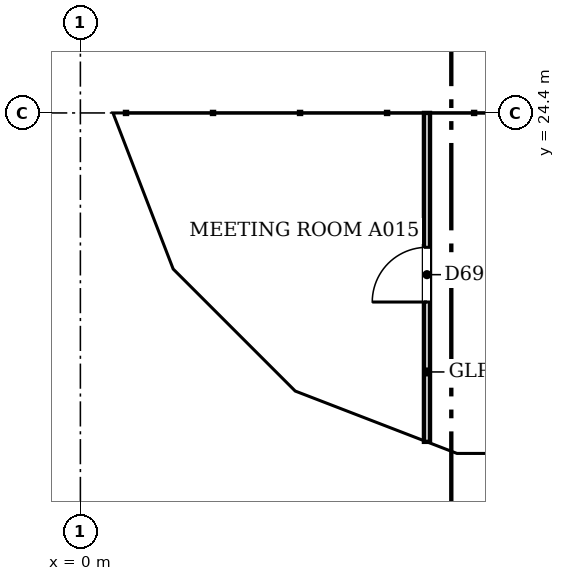
"""IFC4 building model, lengths in metres.
Left out: names, types, materials, properties, quantities, classifications, styles, units other than length and angle.
Written with IfcOpenShell. Run it as: python <this file> out.ifc"""

import sys

from ifc_helpers import new_model, si_unit, direction, frame, frame_2d, origin, place, context, subcontext, project, spatial, polyline, rectangle, outline, extrude, faceted_brep, source, transform, mapped, element, fill, save


model = new_model("IFC4")
c1 = context("Model", 3, precision=1e-05, world=origin(), true_north=direction((0.0, 1.0)))
c2 = subcontext(c1, "Body", "Model", "MODEL_VIEW")
j1 = project(units=[si_unit("LENGTHUNIT", "METRE"), si_unit("PLANEANGLEUNIT", "RADIAN")], contexts=[c1])
p1 = place(None, origin())
s1 = spatial("IfcSite", under=j1, at=p1, CompositionType="ELEMENT")
p2 = place(p1, origin())
s2 = spatial("IfcBuilding", under=s1, at=p2, CompositionType="ELEMENT")
p3 = place(p2, frame((0.0, 0.0, 159.2)))
s3 = spatial("IfcBuildingStorey", under=s2, at=p3, CompositionType="ELEMENT", Elevation=159.2)
m1 = source(origin(), c2, "Body", "Brep", [
    faceted_brep([(3.003, -0.25, 0.0), (3.05, -0.25, 0.06), (3.05, -0.25, 7.54), (3.003, -0.25, 7.6), (0.0, -0.25, 3.8), (0.0, 0.25, 3.8), (2.957, 0.25, 7.541), (2.957, 0.25, 0.059), (3.003, 0.0, 0.0), (3.003, 0.0, 7.6)], [[[0, 1, 2, 3, 4]], [[5, 6, 7]], [[1, 0, 8]], [[9, 3, 2]], [[6, 5, 4, 3, 9]], [[5, 7, 8, 0, 4]], [[1, 8, 7, 6, 9, 2]]]),
])
p4 = place(p3, frame((0.25, 27.45, -3.8), z_axis=(0.0, 0.0, 1.0), x_axis=(0.0, -1.0, 0.0)))
e1 = element("IfcWall", 1, at=p4, inside=s3, PredefinedType="SOLIDWALL", context=c2, shape_type="MappedRepresentation", body=[
    mapped(m1, transform((0.0, 0.0, 0.0), scale=1.0)),
])
m2 = source(origin(), c2, "Body", "SweptSolid", [
    extrude(outline(polyline([(2.803, 6.944), (0.319, 3.8), (2.803, 0.656), (2.803, 6.944)])), frame((0.0, 0.26, 0.0), z_axis=(0.0, -1.0, 0.0), x_axis=(1.0, 0.0, 0.0)), (0.0, 0.0, 1.0), 0.52),
])
p5 = place(p4, origin())
e2 = element("IfcOpeningElement", 2, at=p5, cuts=e1, PredefinedType="OPENING", context=c2, shape_type="MappedRepresentation", body=[
    mapped(m2, transform((0.0, 0.0, 0.0), scale=1.0)),
])
m3 = source(origin(), c2, "Body", "Brep", [
    faceted_brep([(0.047, -0.25, 0.0), (2.997, -0.25, 3.8), (0.047, -0.25, 7.6), (0.0, -0.25, 7.541), (0.0, -0.25, 0.059), (0.093, 0.25, 7.54), (2.944, 0.25, 3.868), (2.944, 0.25, 3.732), (0.093, 0.25, 0.06), (2.997, 0.0, 3.8), (0.047, 0.0, 0.0), (0.047, 0.0, 7.6)], [[[0, 1, 2, 3, 4]], [[5, 6, 7, 8]], [[8, 7, 9, 1, 0, 10]], [[6, 5, 11, 2, 1, 9]], [[3, 2, 11]], [[10, 0, 4]], [[8, 10, 4, 3, 11, 5]], [[9, 7, 6]]]),
])
p6 = place(p3, frame((0.233, 24.49, -3.8), z_axis=(0.0, 0.0, 1.0), x_axis=(0.359901446078, -0.932990326376, 0.0)))
e3 = element("IfcWall", 3, at=p6, inside=s3, PredefinedType="SOLIDWALL", context=c2, shape_type="MappedRepresentation", body=[
    mapped(m3, transform((0.0, 0.0, 0.0), scale=1.0)),
])
m4 = source(origin(), c2, "Body", "SweptSolid", [
    extrude(outline(polyline([(0.247, 0.665), (2.681, 3.8), (0.247, 6.935), (0.247, 0.665)])), frame((0.0, 0.26, 0.0), z_axis=(0.0, -1.0, 0.0), x_axis=(1.0, 0.0, 0.0)), (0.0, 0.0, 1.0), 0.52),
])
p7 = place(p6, origin())
e4 = element("IfcOpeningElement", 4, at=p7, cuts=e3, PredefinedType="OPENING", context=c2, shape_type="MappedRepresentation", body=[
    mapped(m4, transform((0.0, 0.0, 0.0), scale=1.0)),
])
m5 = source(origin(), c2, "Body", "Brep", [
    faceted_brep([(2.944, -0.25, 0.0), (2.997, -0.25, 0.068), (2.997, -0.25, 7.532), (2.944, -0.25, 7.6), (0.0, -0.25, 3.8), (0.053, 0.25, 3.868), (2.891, 0.25, 7.532), (2.891, 0.25, 0.068), (0.053, 0.25, 3.732), (2.944, 0.0, 0.0), (2.944, 0.0, 7.6), (0.0, 0.0, 3.8)], [[[0, 1, 2, 3, 4]], [[5, 6, 7, 8]], [[1, 0, 9]], [[10, 3, 2]], [[6, 5, 11, 4, 3, 10]], [[8, 7, 9, 0, 4, 11]], [[8, 11, 5]], [[1, 9, 7, 6, 10, 2]]]),
])
p8 = place(p3, frame((1.312, 21.694, -3.8), z_axis=(0.0, 0.0, 1.0), x_axis=(0.707066050402, -0.707147509625, 0.0)))
e5 = element("IfcWall", 5, at=p8, inside=s3, PredefinedType="SOLIDWALL", context=c2, shape_type="MappedRepresentation", body=[
    mapped(m5, transform((0.0, 0.0, 0.0), scale=1.0)),
])
m6 = source(origin(), c2, "Body", "SweptSolid", [
    extrude(outline(polyline([(2.744, 6.934), (0.316, 3.8), (2.744, 0.667), (2.744, 6.934)])), frame((0.0, 0.26, 0.0), z_axis=(0.0, -1.0, 0.0), x_axis=(1.0, 0.0, 0.0)), (0.0, 0.0, 1.0), 0.52),
])
p9 = place(p8, origin())
e6 = element("IfcOpeningElement", 6, at=p9, cuts=e5, PredefinedType="OPENING", context=c2, shape_type="MappedRepresentation", body=[
    mapped(m6, transform((0.0, 0.0, 0.0), scale=1.0)),
])
m7 = source(origin(), c2, "Body", "Brep", [
    faceted_brep([(0.053, -0.25, 0.0), (3.003, -0.25, 3.8), (0.053, -0.25, 7.6), (0.0, -0.25, 7.532), (0.0, -0.25, 0.068), (0.106, 0.25, 7.532), (2.957, 0.25, 3.86), (2.957, 0.25, 3.74), (0.106, 0.25, 0.068), (3.003, 0.0, 3.8), (0.053, 0.0, 0.0), (0.053, 0.0, 7.6)], [[[0, 1, 2, 3, 4]], [[5, 6, 7, 8]], [[8, 7, 9, 1, 0, 10]], [[6, 5, 11, 2, 1, 9]], [[3, 2, 11]], [[10, 0, 4]], [[8, 10, 4, 3, 11, 5]], [[9, 7, 6]]]),
])
p10 = place(p3, frame((3.344, 19.631, -3.8), z_axis=(0.0, 0.0, 1.0), x_axis=(0.933007896601, -0.359855894603, 0.0)))
e7 = element("IfcWall", 7, at=p10, inside=s3, PredefinedType="SOLIDWALL", context=c2, shape_type="MappedRepresentation", body=[
    mapped(m7, transform((0.0, 0.0, 0.0), scale=1.0)),
])
m8 = source(origin(), c2, "Body", "SweptSolid", [
    extrude(outline(polyline([(0.253, 0.665), (2.687, 3.8), (0.253, 6.935), (0.253, 0.665)])), frame((0.0, 0.26, 0.0), z_axis=(0.0, -1.0, 0.0), x_axis=(1.0, 0.0, 0.0)), (0.0, 0.0, 1.0), 0.52),
])
p11 = place(p10, origin())
e8 = element("IfcOpeningElement", 8, at=p11, cuts=e7, PredefinedType="OPENING", context=c2, shape_type="MappedRepresentation", body=[
    mapped(m8, transform((0.0, 0.0, 0.0), scale=1.0)),
])
m9 = source(origin(), c2, "Body", "Brep", [
    faceted_brep([(3.003, -0.25, 0.0), (6.053, -0.25, 3.8), (3.003, -0.25, 7.6), (0.0, -0.25, 3.8), (0.047, 0.25, 3.859), (3.003, 0.25, 7.6), (6.053, 0.25, 3.8), (3.003, 0.25, 0.0), (0.047, 0.25, 3.741), (0.0, 0.0, 3.8)], [[[0, 1, 2, 3]], [[4, 5, 6, 7, 8]], [[7, 6, 1, 0]], [[6, 5, 2, 1]], [[5, 4, 9, 3, 2]], [[8, 7, 0, 3, 9]], [[8, 9, 4]]]),
])
p12 = place(p3, frame((6.146, 18.55, -3.8), z_axis=(0.0, 0.0, 1.0), x_axis=(1.0, 0.0, 0.0)))
e9 = element("IfcWall", 9, at=p12, inside=s3, PredefinedType="SOLIDWALL", context=c2, shape_type="MappedRepresentation", body=[
    mapped(m9, transform((0.0, 0.0, 0.0), scale=1.0)),
])
m10 = source(origin(), c2, "Body", "SweptSolid", [
    extrude(outline(polyline([(3.005, 0.401), (5.733, 3.8), (3.005, 7.199), (0.319, 3.8), (3.005, 0.401)])), frame((0.0, 0.26, 0.0), z_axis=(0.0, -1.0, 0.0), x_axis=(1.0, 0.0, 0.0)), (0.0, 0.0, 1.0), 0.52),
])
p13 = place(p12, origin())
e10 = element("IfcOpeningElement", 10, at=p13, cuts=e9, PredefinedType="OPENING", context=c2, shape_type="MappedRepresentation", body=[
    mapped(m10, transform((0.0, 0.0, 0.0), scale=1.0)),
])
p14 = place(p2, frame((0.0, 0.0, 163.0)))
s4 = spatial("IfcBuildingStorey", under=s2, at=p14, CompositionType="ELEMENT", Elevation=163.0)
m11 = source(origin(), c2, "Body", "Brep", [
    faceted_brep([(3.05, -0.25, 0.0), (6.053, -0.25, 3.8), (3.05, -0.25, 7.6), (0.0, -0.25, 3.8), (0.0, 0.25, 3.8), (3.05, 0.25, 7.6), (6.007, 0.25, 3.859), (6.007, 0.25, 3.741), (3.05, 0.25, 0.0), (6.053, 0.0, 3.8)], [[[0, 1, 2, 3]], [[4, 5, 6, 7, 8]], [[8, 7, 9, 1, 0]], [[6, 5, 2, 1, 9]], [[5, 4, 3, 2]], [[4, 8, 0, 3]], [[9, 7, 6]]]),
])
p15 = place(p14, frame((0.25, 30.5, -3.8), z_axis=(0.0, 0.0, 1.0), x_axis=(0.0, -1.0, 0.0)))
e11 = element("IfcWall", 11, at=p15, inside=s4, PredefinedType="SOLIDWALL", context=c2, shape_type="MappedRepresentation", body=[
    mapped(m11, transform((0.0, 0.0, 0.0), scale=1.0)),
])
m12 = source(origin(), c2, "Body", "SweptSolid", [
    extrude(outline(polyline([(3.049, 0.401), (5.735, 3.8), (3.049, 7.199), (0.321, 3.8), (3.049, 0.401)])), frame((0.0, 0.26, 0.0), z_axis=(0.0, -1.0, 0.0), x_axis=(1.0, 0.0, 0.0)), (0.0, 0.0, 1.0), 0.52),
])
p16 = place(p15, origin())
e12 = element("IfcOpeningElement", 12, at=p16, cuts=e11, PredefinedType="OPENING", context=c2, shape_type="MappedRepresentation", body=[
    mapped(m12, transform((0.0, 0.0, 0.0), scale=1.0)),
])
m13 = source(origin(), c2, "Body", "Brep", [
    faceted_brep([(2.95, -0.25, 0.0), (3.003, -0.25, 0.068), (3.003, -0.25, 7.532), (2.95, -0.25, 7.6), (0.0, -0.25, 3.8), (0.047, 0.25, 3.86), (2.898, 0.25, 7.532), (2.898, 0.25, 0.068), (0.047, 0.25, 3.74), (2.95, 0.0, 0.0), (2.95, 0.0, 7.6), (0.0, 0.0, 3.8)], [[[0, 1, 2, 3, 4]], [[5, 6, 7, 8]], [[1, 0, 9]], [[10, 3, 2]], [[6, 5, 11, 4, 3, 10]], [[8, 7, 9, 0, 4, 11]], [[8, 11, 5]], [[1, 9, 7, 6, 10, 2]]]),
])
p17 = place(p14, frame((0.25, 24.447, -3.8), z_axis=(0.0, 0.0, 1.0), x_axis=(0.35992665181, -0.932980602862, 0.0)))
e13 = element("IfcWall", 13, at=p17, inside=s4, PredefinedType="SOLIDWALL", context=c2, shape_type="MappedRepresentation", body=[
    mapped(m13, transform((0.0, 0.0, 0.0), scale=1.0)),
])
m14 = source(origin(), c2, "Body", "SweptSolid", [
    extrude(outline(polyline([(2.75, 6.935), (0.316, 3.8), (2.75, 0.665), (2.75, 6.935)])), frame((0.0, 0.26, 0.0), z_axis=(0.0, -1.0, 0.0), x_axis=(1.0, 0.0, 0.0)), (0.0, 0.0, 1.0), 0.52),
])
p18 = place(p17, origin())
e14 = element("IfcOpeningElement", 14, at=p18, cuts=e13, PredefinedType="OPENING", context=c2, shape_type="MappedRepresentation", body=[
    mapped(m14, transform((0.0, 0.0, 0.0), scale=1.0)),
])
m15 = source(origin(), c2, "Body", "Brep", [
    faceted_brep([(0.053, -0.25, 0.0), (2.997, -0.25, 3.8), (0.053, -0.25, 7.6), (0.0, -0.25, 7.532), (0.0, -0.25, 0.068), (0.106, 0.25, 7.532), (2.944, 0.25, 3.868), (2.944, 0.25, 3.732), (0.106, 0.25, 0.068), (2.997, 0.0, 3.8), (0.053, 0.0, 0.0), (0.053, 0.0, 7.6)], [[[0, 1, 2, 3, 4]], [[5, 6, 7, 8]], [[8, 7, 9, 1, 0, 10]], [[6, 5, 11, 2, 1, 9]], [[3, 2, 11]], [[10, 0, 4]], [[8, 10, 4, 3, 11, 5]], [[9, 7, 6]]]),
])
p19 = place(p14, frame((1.274, 21.731, -3.8), z_axis=(0.0, 0.0, 1.0), x_axis=(0.707147509625, -0.707066050402, 0.0)))
e15 = element("IfcWall", 15, at=p19, inside=s4, PredefinedType="SOLIDWALL", context=c2, shape_type="MappedRepresentation", body=[
    mapped(m15, transform((0.0, 0.0, 0.0), scale=1.0)),
])
m16 = source(origin(), c2, "Body", "SweptSolid", [
    extrude(outline(polyline([(0.253, 0.666), (2.681, 3.8), (0.253, 6.934), (0.253, 0.666)])), frame((0.0, 0.26, 0.0), z_axis=(0.0, -1.0, 0.0), x_axis=(1.0, 0.0, 0.0)), (0.0, 0.0, 1.0), 0.52),
])
p20 = place(p19, origin())
e16 = element("IfcOpeningElement", 16, at=p20, cuts=e15, PredefinedType="OPENING", context=c2, shape_type="MappedRepresentation", body=[
    mapped(m16, transform((0.0, 0.0, 0.0), scale=1.0)),
])
m17 = source(origin(), c2, "Body", "Brep", [
    faceted_brep([(2.95, -0.25, 0.0), (2.997, -0.25, 0.059), (2.997, -0.25, 7.541), (2.95, -0.25, 7.6), (0.0, -0.25, 3.8), (0.053, 0.25, 3.868), (2.904, 0.25, 7.54), (2.904, 0.25, 0.06), (0.053, 0.25, 3.732), (2.95, 0.0, 0.0), (2.95, 0.0, 7.6), (0.0, 0.0, 3.8)], [[[0, 1, 2, 3, 4]], [[5, 6, 7, 8]], [[1, 0, 9]], [[10, 3, 2]], [[6, 5, 11, 4, 3, 10]], [[8, 7, 9, 0, 4, 11]], [[8, 11, 5]], [[1, 9, 7, 6, 10, 2]]]),
])
p21 = place(p14, frame((3.394, 19.612, -3.8), z_axis=(0.0, 0.0, 1.0), x_axis=(0.932990326376, -0.359901446078, 0.0)))
e17 = element("IfcWall", 17, at=p21, inside=s4, PredefinedType="SOLIDWALL", context=c2, shape_type="MappedRepresentation", body=[
    mapped(m17, transform((0.0, 0.0, 0.0), scale=1.0)),
])
p22 = place(p21, origin())
e18 = element("IfcOpeningElement", 18, at=p22, cuts=e17, PredefinedType="OPENING", context=c2, shape_type="MappedRepresentation", body=[
    mapped(m14, transform((0.0, 0.0, 0.0), scale=1.0)),
])
m18 = source(origin(), c2, "Body", "Brep", [
    faceted_brep([(0.047, -0.25, 0.0), (3.05, -0.25, 3.8), (0.047, -0.25, 7.6), (0.0, -0.25, 7.54), (0.0, -0.25, 0.06), (0.093, 0.25, 7.541), (3.05, 0.25, 3.8), (0.093, 0.25, 0.059), (0.047, 0.0, 0.0), (0.047, 0.0, 7.6)], [[[0, 1, 2, 3, 4]], [[5, 6, 7]], [[7, 6, 1, 0, 8]], [[6, 5, 9, 2, 1]], [[3, 2, 9]], [[8, 0, 4]], [[7, 8, 4, 3, 9, 5]]]),
])
p23 = place(p14, frame((6.1, 18.55, -3.8), z_axis=(0.0, 0.0, 1.0), x_axis=(1.0, 0.0, 0.0)))
e19 = element("IfcWall", 19, at=p23, inside=s4, PredefinedType="SOLIDWALL", context=c2, shape_type="MappedRepresentation", body=[
    mapped(m18, transform((0.0, 0.0, 0.0), scale=1.0)),
])
m19 = source(origin(), c2, "Body", "SweptSolid", [
    extrude(outline(polyline([(0.247, 0.656), (2.731, 3.8), (0.247, 6.944), (0.247, 0.656)])), frame((0.0, 0.26, 0.0), z_axis=(0.0, -1.0, 0.0), x_axis=(1.0, 0.0, 0.0)), (0.0, 0.0, 1.0), 0.52),
])
p24 = place(p23, origin())
e20 = element("IfcOpeningElement", 20, at=p24, cuts=e19, PredefinedType="OPENING", context=c2, shape_type="MappedRepresentation", body=[
    mapped(m19, transform((0.0, 0.0, 0.0), scale=1.0)),
])
p25 = place(p3, frame((5.7, 18.99, 0.0), z_axis=(0.0, 0.0, 1.0), x_axis=(0.0, 1.0, 0.0)))
e21 = element("IfcWall", 21, at=p25, inside=s3, PredefinedType="PARTITIONING", context=c2, shape_type="SweptSolid", body=[
    extrude(rectangle(XDim=5.41, YDim=0.1, at=frame_2d((2.705, 0.0))), origin(), (0.0, 0.0, 1.0), 3.067),
])
m20 = source(origin(), c2, "Body", "SweptSolid", [
    extrude(rectangle(XDim=0.9, YDim=2.1, at=frame_2d((0.45, 1.05))), frame((0.0, 0.06, 0.0), z_axis=(0.0, -1.0, 0.0), x_axis=(1.0, 0.0, 0.0)), (0.0, 0.0, 1.0), 0.12),
])
p26 = place(p25, frame((2.3, 0.0, 0.0)))
e22 = element("IfcOpeningElement", 22, at=p26, cuts=e21, PredefinedType="OPENING", context=c2, shape_type="MappedRepresentation", body=[
    mapped(m20, transform((0.0, 0.0, 0.0), scale=1.0)),
])
m21 = source(origin(), c2, "Body", "SweptSolid", [
    extrude(rectangle(XDim=0.9, YDim=2.1, at=frame_2d((0.45, 1.05))), frame((0.0, 0.025, 0.0), z_axis=(0.0, -1.0, 0.0), x_axis=(1.0, 0.0, 0.0)), (0.0, 0.0, 1.0), 0.05),
])
p27 = place(p26, origin())
e23 = element("IfcDoor", 23, at=p27, inside=s3, OperationType="SINGLE_SWING_LEFT", PredefinedType="DOOR", context=c2, shape_type="MappedRepresentation", body=[
    mapped(m21, transform((0.0, 0.0, 0.0), scale=1.0)),
])
fill(e22, e23)
save(model, sys.argv[1])
